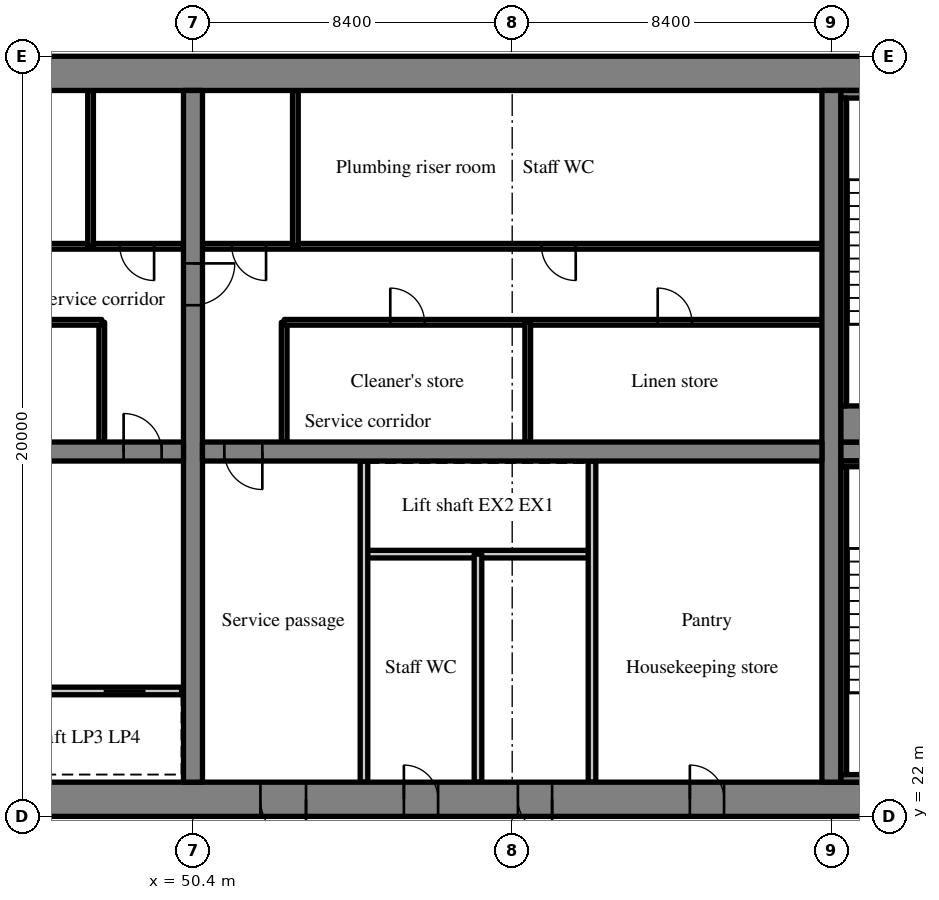
"""IFC4 building model, lengths in metres.
Left out: names, types, materials, properties, quantities, classifications, styles, units other than length and angle.
Written with IfcOpenShell. Run it as: python <this file> out.ifc"""

import sys

from ifc_helpers import new_model, si_unit, direction, frame, frame_2d, origin, place, context, subcontext, project, spatial, rectangle, extrude, source, transform, mapped, element, fill, save


model = new_model("IFC4")
c1 = context("Model", 3, precision=1e-05, world=origin(), true_north=direction((0.0, 1.0)))
c2 = subcontext(c1, "Body", "Model", "MODEL_VIEW")
j1 = project(units=[si_unit("LENGTHUNIT", "METRE"), si_unit("PLANEANGLEUNIT", "RADIAN")], contexts=[c1])
p1 = place(None, origin())
s1 = spatial("IfcSite", under=j1, at=p1, CompositionType="ELEMENT")
p2 = place(p1, origin())
s2 = spatial("IfcBuilding", under=s1, at=p2, CompositionType="ELEMENT")
p3 = place(p2, frame((0.0, 0.0, 121.8)))
s3 = spatial("IfcBuildingStorey", under=s2, at=p3, CompositionType="ELEMENT", Elevation=121.8)
m1 = source(origin(), c2, "Body", "SweptSolid", [
    extrude(rectangle(XDim=50.4, YDim=0.9, at=frame_2d((25.2, 0.0))), origin(), (0.0, 0.0, 1.0), 3.52),
])
p4 = place(p3, frame((25.2, 22.45, 0.0), z_axis=(0.0, 0.0, 1.0), x_axis=(1.0, 0.0, 0.0)))
e1 = element("IfcWall", 1, at=p4, inside=s3, PredefinedType="SHEAR", context=c2, shape_type="MappedRepresentation", body=[
    mapped(m1, transform((0.0, 0.0, 0.0), scale=1.0)),
])
m2 = source(origin(), c2, "Body", "SweptSolid", [
    extrude(rectangle(XDim=1.8, YDim=2.1, at=frame_2d((0.9, 1.05))), frame((0.0, 0.46, 0.0), z_axis=(0.0, -1.0, 0.0), x_axis=(1.0, 0.0, 0.0)), (0.0, 0.0, 1.0), 0.92),
])
p5 = place(p4, frame((15.9, 0.0, 0.0)))
e2 = element("IfcOpeningElement", 2, at=p5, cuts=e1, PredefinedType="OPENING", context=c2, shape_type="MappedRepresentation", body=[
    mapped(m2, transform((0.0, 0.0, 0.0), scale=1.0)),
])
m3 = source(origin(), c2, "Body", "SweptSolid", [
    extrude(rectangle(XDim=1.2, YDim=2.1, at=frame_2d((0.6, 1.05))), frame((0.0, 0.46, 0.0), z_axis=(0.0, -1.0, 0.0), x_axis=(1.0, 0.0, 0.0)), (0.0, 0.0, 1.0), 0.92),
])
p6 = place(p4, frame((26.975, 0.0, 0.0)))
e3 = element("IfcOpeningElement", 3, at=p6, cuts=e1, PredefinedType="OPENING", context=c2, shape_type="MappedRepresentation", body=[
    mapped(m3, transform((0.0, 0.0, 0.0), scale=1.0)),
])
m4 = source(origin(), c2, "Body", "SweptSolid", [
    extrude(rectangle(XDim=0.9, YDim=2.1, at=frame_2d((0.45, 1.05))), frame((0.0, 0.46, 0.0), z_axis=(0.0, -1.0, 0.0), x_axis=(1.0, 0.0, 0.0)), (0.0, 0.0, 1.0), 0.92),
])
p7 = place(p4, frame((33.75, 0.0, 0.0)))
e4 = element("IfcOpeningElement", 4, at=p7, cuts=e1, PredefinedType="OPENING", context=c2, shape_type="MappedRepresentation", body=[
    mapped(m4, transform((0.0, 0.0, 0.0), scale=1.0)),
])
p8 = place(p4, frame((30.75, 0.0, 0.0)))
e5 = element("IfcOpeningElement", 5, at=p8, cuts=e1, PredefinedType="OPENING", context=c2, shape_type="MappedRepresentation", body=[
    mapped(m4, transform((0.0, 0.0, 0.0), scale=1.0)),
])
p9 = place(p4, frame((38.275, 0.0, 0.0)))
e6 = element("IfcOpeningElement", 6, at=p9, cuts=e1, PredefinedType="OPENING", context=c2, shape_type="MappedRepresentation", body=[
    mapped(m4, transform((0.0, 0.0, 0.0), scale=1.0)),
])
p10 = place(p4, frame((6.45, 0.0, 0.0)))
e7 = element("IfcOpeningElement", 7, at=p10, cuts=e1, PredefinedType="OPENING", context=c2, shape_type="MappedRepresentation", body=[
    mapped(m3, transform((0.0, 0.0, 0.0), scale=1.0)),
])
p11 = place(p4, frame((47.775, 0.0, 0.0)))
e8 = element("IfcOpeningElement", 8, at=p11, cuts=e1, PredefinedType="OPENING", context=c2, shape_type="MappedRepresentation", body=[
    mapped(m3, transform((0.0, 0.0, 0.0), scale=1.0)),
])
p12 = place(p3, frame((25.2, 41.55, 0.0), z_axis=(0.0, 0.0, 1.0), x_axis=(1.0, 0.0, 0.0)))
e9 = element("IfcWall", 9, at=p12, inside=s3, PredefinedType="SHEAR", context=c2, shape_type="MappedRepresentation", body=[
    mapped(m1, transform((0.0, 0.0, 0.0), scale=1.0)),
])
m5 = source(origin(), c2, "Body", "SweptSolid", [
    extrude(rectangle(XDim=18.2, YDim=0.5, at=frame_2d((9.1, 0.0))), origin(), (0.0, 0.0, 1.0), 3.52),
])
p13 = place(p3, frame((50.4, 22.9, 0.0), z_axis=(0.0, 0.0, 1.0), x_axis=(0.0, 1.0, 0.0)))
e10 = element("IfcWall", 10, at=p13, inside=s3, PredefinedType="SHEAR", context=c2, shape_type="MappedRepresentation", body=[
    mapped(m5, transform((0.0, 0.0, 0.0), scale=1.0)),
])
m6 = source(origin(), c2, "Body", "SweptSolid", [
    extrude(rectangle(XDim=1.1, YDim=2.1, at=frame_2d((0.55, 1.05))), frame((0.0, 0.26, 0.0), z_axis=(0.0, -1.0, 0.0), x_axis=(1.0, 0.0, 0.0)), (0.0, 0.0, 1.0), 0.52),
])
p14 = place(p13, frame((12.55, 0.0, 0.0)))
e11 = element("IfcOpeningElement", 11, at=p14, cuts=e10, PredefinedType="OPENING", context=c2, shape_type="MappedRepresentation", body=[
    mapped(m6, transform((0.0, 0.0, 0.0), scale=1.0)),
])
p15 = place(p3, frame((67.2, 22.9, 0.0), z_axis=(0.0, 0.0, 1.0), x_axis=(0.0, 1.0, 0.0)))
e12 = element("IfcWall", 12, at=p15, inside=s3, PredefinedType="SHEAR", context=c2, shape_type="MappedRepresentation", body=[
    mapped(m5, transform((0.0, 0.0, 0.0), scale=1.0)),
])
m7 = source(origin(), c2, "Body", "SweptSolid", [
    extrude(rectangle(XDim=16.3, YDim=0.5, at=frame_2d((8.15, 0.0))), origin(), (0.0, 0.0, 1.0), 3.52),
])
p16 = place(p3, frame((33.85, 31.6, 0.0), z_axis=(0.0, 0.0, 1.0), x_axis=(1.0, 0.0, 0.0)))
e13 = element("IfcWall", 13, at=p16, inside=s3, PredefinedType="SHEAR", context=c2, shape_type="MappedRepresentation", body=[
    mapped(m7, transform((0.0, 0.0, 0.0), scale=1.0)),
])
m8 = source(origin(), c2, "Body", "SweptSolid", [
    extrude(rectangle(XDim=1.0, YDim=2.1, at=frame_2d((0.5, 1.05))), frame((0.0, 0.26, 0.0), z_axis=(0.0, -1.0, 0.0), x_axis=(1.0, 0.0, 0.0)), (0.0, 0.0, 1.0), 0.52),
])
p17 = place(p16, frame((14.725, 0.0, 0.0)))
e14 = element("IfcOpeningElement", 14, at=p17, cuts=e13, PredefinedType="OPENING", context=c2, shape_type="MappedRepresentation", body=[
    mapped(m8, transform((0.0, 0.0, 0.0), scale=1.0)),
])
m9 = source(origin(), c2, "Body", "SweptSolid", [
    extrude(rectangle(XDim=16.3, YDim=0.5, at=frame_2d((8.15, 0.0))), origin(), (0.0, 0.0, 1.0), 3.52),
])
p18 = place(p3, frame((50.65, 31.6, 0.0), z_axis=(0.0, 0.0, 1.0), x_axis=(1.0, 0.0, 0.0)))
e15 = element("IfcWall", 15, at=p18, inside=s3, PredefinedType="SHEAR", context=c2, shape_type="MappedRepresentation", body=[
    mapped(m9, transform((0.0, 0.0, 0.0), scale=1.0)),
])
p19 = place(p18, frame((0.575, 0.0, 0.0)))
e16 = element("IfcOpeningElement", 16, at=p19, cuts=e15, PredefinedType="OPENING", context=c2, shape_type="MappedRepresentation", body=[
    mapped(m8, transform((0.0, 0.0, 0.0), scale=1.0)),
])
m10 = source(origin(), c2, "Body", "SweptSolid", [
    extrude(rectangle(XDim=7.25, YDim=0.5, at=frame_2d((3.625, 0.0))), origin(), (0.0, 0.0, 1.0), 3.52),
])
p20 = place(p3, frame((67.45, 31.6, 0.0), z_axis=(0.0, 0.0, 1.0), x_axis=(1.0, 0.0, 0.0)))
e17 = element("IfcWall", 17, at=p20, inside=s3, PredefinedType="SHEAR", context=c2, shape_type="MappedRepresentation", body=[
    mapped(m10, transform((0.0, 0.0, 0.0), scale=1.0)),
])
p21 = place(p20, frame((5.575, 0.0, 0.0)))
e18 = element("IfcOpeningElement", 18, at=p21, cuts=e17, PredefinedType="OPENING", context=c2, shape_type="MappedRepresentation", body=[
    mapped(m6, transform((0.0, 0.0, 0.0), scale=1.0)),
])
m11 = source(origin(), c2, "Body", "SweptSolid", [
    extrude(rectangle(XDim=6.0, YDim=0.2, at=frame_2d((3.0, 0.0))), origin(), (0.0, 0.0, 1.0), 3.52),
])
p22 = place(p3, frame((44.1, 25.3, 0.0), z_axis=(0.0, 0.0, 1.0), x_axis=(1.0, 0.0, 0.0)))
e19 = element("IfcWall", 19, at=p22, inside=s3, PredefinedType="SOLIDWALL", context=c2, shape_type="MappedRepresentation", body=[
    mapped(m11, transform((0.0, 0.0, 0.0), scale=1.0)),
])
m12 = source(origin(), c2, "Body", "SweptSolid", [
    extrude(rectangle(XDim=1.1, YDim=2.1, at=frame_2d((0.55, 1.05))), frame((0.0, 0.11, 0.0), z_axis=(0.0, -1.0, 0.0), x_axis=(1.0, 0.0, 0.0)), (0.0, 0.0, 1.0), 0.22),
])
p23 = place(p22, frame((0.95, 0.0, 0.0)))
e20 = element("IfcOpeningElement", 20, at=p23, cuts=e19, PredefinedType="OPENING", context=c2, shape_type="MappedRepresentation", body=[
    mapped(m12, transform((0.0, 0.0, 0.0), scale=1.0)),
])
p24 = place(p22, frame((3.95, 0.0, 0.0)))
e21 = element("IfcOpeningElement", 21, at=p24, cuts=e19, PredefinedType="OPENING", context=c2, shape_type="MappedRepresentation", body=[
    mapped(m12, transform((0.0, 0.0, 0.0), scale=1.0)),
])
m13 = source(origin(), c2, "Body", "SweptSolid", [
    extrude(rectangle(XDim=3.15, YDim=0.15, at=frame_2d((1.575, 0.0))), origin(), (0.0, 0.0, 1.0), 3.52),
])
p25 = place(p3, frame((48.0, 31.85, 0.0), z_axis=(0.0, 0.0, 1.0), x_axis=(0.0, 1.0, 0.0)))
e22 = element("IfcWall", 22, at=p25, inside=s3, PredefinedType="PARTITIONING", context=c2, shape_type="MappedRepresentation", body=[
    mapped(m13, transform((0.0, 0.0, 0.0), scale=1.0)),
])
m14 = source(origin(), c2, "Body", "SweptSolid", [
    extrude(rectangle(XDim=14.15, YDim=0.15, at=frame_2d((7.075, 0.0))), origin(), (0.0, 0.0, 1.0), 3.52),
])
p26 = place(p3, frame((33.85, 35.0, 0.0), z_axis=(0.0, 0.0, 1.0), x_axis=(1.0, 0.0, 0.0)))
e23 = element("IfcWall", 23, at=p26, inside=s3, PredefinedType="PARTITIONING", context=c2, shape_type="MappedRepresentation", body=[
    mapped(m14, transform((0.0, 0.0, 0.0), scale=1.0)),
])
m15 = source(origin(), c2, "Body", "SweptSolid", [
    extrude(rectangle(XDim=0.9, YDim=2.1, at=frame_2d((0.45, 1.05))), frame((0.0, 0.085, 0.0), z_axis=(0.0, -1.0, 0.0), x_axis=(1.0, 0.0, 0.0)), (0.0, 0.0, 1.0), 0.17),
])
p27 = place(p26, frame((6.588, 0.0, 0.0)))
e24 = element("IfcOpeningElement", 24, at=p27, cuts=e23, PredefinedType="OPENING", context=c2, shape_type="MappedRepresentation", body=[
    mapped(m15, transform((0.0, 0.0, 0.0), scale=1.0)),
])
m16 = source(origin(), c2, "Body", "SweptSolid", [
    extrude(rectangle(XDim=16.3, YDim=0.15, at=frame_2d((8.15, 0.0))), origin(), (0.0, 0.0, 1.0), 3.52),
])
p28 = place(p3, frame((33.85, 37.0, 0.0), z_axis=(0.0, 0.0, 1.0), x_axis=(1.0, 0.0, 0.0)))
e25 = element("IfcWall", 25, at=p28, inside=s3, PredefinedType="PARTITIONING", context=c2, shape_type="MappedRepresentation", body=[
    mapped(m16, transform((0.0, 0.0, 0.0), scale=1.0)),
])
p29 = place(p28, frame((0.773, 0.0, 0.0)))
e26 = element("IfcOpeningElement", 26, at=p29, cuts=e25, PredefinedType="OPENING", context=c2, shape_type="MappedRepresentation", body=[
    mapped(m15, transform((0.0, 0.0, 0.0), scale=1.0)),
])
p30 = place(p28, frame((3.625, 0.0, 0.0)))
e27 = element("IfcOpeningElement", 27, at=p30, cuts=e25, PredefinedType="OPENING", context=c2, shape_type="MappedRepresentation", body=[
    mapped(m15, transform((0.0, 0.0, 0.0), scale=1.0)),
])
p31 = place(p28, frame((9.33, 0.0, 0.0)))
e28 = element("IfcOpeningElement", 28, at=p31, cuts=e25, PredefinedType="OPENING", context=c2, shape_type="MappedRepresentation", body=[
    mapped(m15, transform((0.0, 0.0, 0.0), scale=1.0)),
])
p32 = place(p28, frame((14.627, 0.0, 0.0)))
e29 = element("IfcOpeningElement", 29, at=p32, cuts=e25, PredefinedType="OPENING", context=c2, shape_type="MappedRepresentation", body=[
    mapped(m15, transform((0.0, 0.0, 0.0), scale=1.0)),
])
m17 = source(origin(), c2, "Body", "SweptSolid", [
    extrude(rectangle(XDim=4.1, YDim=0.15, at=frame_2d((2.05, 0.0))), origin(), (0.0, 0.0, 1.0), 3.52),
])
p33 = place(p3, frame((47.705, 37.0, 0.0), z_axis=(0.0, 0.0, 1.0), x_axis=(0.0, 1.0, 0.0)))
e30 = element("IfcWall", 30, at=p33, inside=s3, PredefinedType="PARTITIONING", context=c2, shape_type="MappedRepresentation", body=[
    mapped(m17, transform((0.0, 0.0, 0.0), scale=1.0)),
])
p34 = place(p3, frame((60.9, 28.9, 0.0), z_axis=(0.0, 0.0, 1.0), x_axis=(-1.0, 0.0, 0.0)))
e31 = element("IfcWall", 31, at=p34, inside=s3, PredefinedType="SOLIDWALL", context=c2, shape_type="MappedRepresentation", body=[
    mapped(m11, transform((0.0, 0.0, 0.0), scale=1.0)),
])
m18 = source(origin(), c2, "Body", "SweptSolid", [
    extrude(rectangle(XDim=8.45, YDim=0.2, at=frame_2d((4.225, 0.0))), origin(), (0.0, 0.0, 1.0), 3.52),
])
for number, where, z_axis, x_axis in (
    (32, (54.9, 22.9, 0.0), (0.0, 0.0, 1.0), (0.0, 1.0, 0.0)),
    (33, (60.9, 22.9, 0.0), (0.0, 0.0, 1.0), (0.0, 1.0, 0.0)),
):
    element("IfcWall", number, at=place(p3, frame(where, z_axis=z_axis, x_axis=x_axis)), inside=s3, PredefinedType="PARTITIONING", context=c2, shape_type="MappedRepresentation", body=[
        mapped(m18, transform((0.0, 0.0, 0.0), scale=1.0)),
    ])
p35 = place(p3, frame((57.9, 22.9, 0.0), z_axis=(0.0, 0.0, 1.0), x_axis=(0.0, 1.0, 0.0)))
e34 = element("IfcWall", 34, at=p35, inside=s3, PredefinedType="PARTITIONING", context=c2, shape_type="MappedRepresentation", body=[
    mapped(m11, transform((0.0, 0.0, 0.0), scale=1.0)),
])
p36 = place(p3, frame((52.8, 31.85, 0.0), z_axis=(0.0, 0.0, 1.0), x_axis=(0.0, 1.0, 0.0)))
e35 = element("IfcWall", 35, at=p36, inside=s3, PredefinedType="PARTITIONING", context=c2, shape_type="MappedRepresentation", body=[
    mapped(m13, transform((0.0, 0.0, 0.0), scale=1.0)),
])
p37 = place(p3, frame((66.95, 35.0, 0.0), z_axis=(0.0, 0.0, 1.0), x_axis=(-1.0, 0.0, 0.0)))
e36 = element("IfcWall", 36, at=p37, inside=s3, PredefinedType="PARTITIONING", context=c2, shape_type="MappedRepresentation", body=[
    mapped(m14, transform((0.0, 0.0, 0.0), scale=1.0)),
])
p38 = place(p37, frame((3.421, 0.0, 0.0)))
e37 = element("IfcOpeningElement", 37, at=p38, cuts=e36, PredefinedType="OPENING", context=c2, shape_type="MappedRepresentation", body=[
    mapped(m15, transform((0.0, 0.0, 0.0), scale=1.0)),
])
p39 = place(p37, frame((10.458, 0.0, 0.0)))
e38 = element("IfcOpeningElement", 38, at=p39, cuts=e36, PredefinedType="OPENING", context=c2, shape_type="MappedRepresentation", body=[
    mapped(m15, transform((0.0, 0.0, 0.0), scale=1.0)),
])
m19 = source(origin(), c2, "Body", "SweptSolid", [
    extrude(rectangle(XDim=16.3, YDim=0.15, at=frame_2d((8.15, 0.0))), origin(), (0.0, 0.0, 1.0), 3.52),
])
p40 = place(p3, frame((66.95, 37.0, 0.0), z_axis=(0.0, 0.0, 1.0), x_axis=(-1.0, 0.0, 0.0)))
e39 = element("IfcWall", 39, at=p40, inside=s3, PredefinedType="PARTITIONING", context=c2, shape_type="MappedRepresentation", body=[
    mapped(m19, transform((0.0, 0.0, 0.0), scale=1.0)),
])
p41 = place(p40, frame((6.478, 0.0, 0.0)))
e40 = element("IfcOpeningElement", 40, at=p41, cuts=e39, PredefinedType="OPENING", context=c2, shape_type="MappedRepresentation", body=[
    mapped(m15, transform((0.0, 0.0, 0.0), scale=1.0)),
])
p42 = place(p40, frame((14.627, 0.0, 0.0)))
e41 = element("IfcOpeningElement", 41, at=p42, cuts=e39, PredefinedType="OPENING", context=c2, shape_type="MappedRepresentation", body=[
    mapped(m15, transform((0.0, 0.0, 0.0), scale=1.0)),
])
p43 = place(p3, frame((59.209, 31.85, 0.0), z_axis=(0.0, 0.0, 1.0), x_axis=(0.0, 1.0, 0.0)))
e42 = element("IfcWall", 42, at=p43, inside=s3, PredefinedType="PARTITIONING", context=c2, shape_type="MappedRepresentation", body=[
    mapped(m13, transform((0.0, 0.0, 0.0), scale=1.0)),
])
p44 = place(p3, frame((53.095, 37.0, 0.0), z_axis=(0.0, 0.0, 1.0), x_axis=(0.0, 1.0, 0.0)))
e43 = element("IfcWall", 43, at=p44, inside=s3, PredefinedType="PARTITIONING", context=c2, shape_type="MappedRepresentation", body=[
    mapped(m17, transform((0.0, 0.0, 0.0), scale=1.0)),
])
m20 = source(origin(), c2, "Body", "SweptSolid", [
    extrude(rectangle(XDim=4.8, YDim=0.2, at=frame_2d((2.4, 0.0))), origin(), (0.0, 0.0, 1.0), 3.52),
])
p45 = place(p3, frame((67.45, 23.0, 0.0), z_axis=(0.0, 0.0, 1.0), x_axis=(1.0, 0.0, 0.0)))
e44 = element("IfcWall", 44, at=p45, inside=s3, PredefinedType="SOLIDWALL", context=c2, shape_type="MappedRepresentation", body=[
    mapped(m20, transform((0.0, 0.0, 0.0), scale=1.0)),
])
m21 = source(origin(), c2, "Body", "SweptSolid", [
    extrude(rectangle(XDim=4.8, YDim=0.15, at=frame_2d((2.4, 0.0))), origin(), (0.0, 0.0, 1.0), 3.52),
])
p46 = place(p3, frame((67.45, 31.275, 0.0), z_axis=(0.0, 0.0, 1.0), x_axis=(1.0, 0.0, 0.0)))
e45 = element("IfcWall", 45, at=p46, inside=s3, PredefinedType="SOLIDWALL", context=c2, shape_type="MappedRepresentation", body=[
    mapped(m21, transform((0.0, 0.0, 0.0), scale=1.0)),
])
m22 = source(origin(), c2, "Body", "SweptSolid", [
    extrude(rectangle(XDim=8.1, YDim=0.15, at=frame_2d((4.05, 0.0))), origin(), (0.0, 0.0, 1.0), 3.52),
])
p47 = place(p3, frame((67.525, 23.1, 0.0), z_axis=(0.0, 0.0, 1.0), x_axis=(0.0, 1.0, 0.0)))
e46 = element("IfcWall", 46, at=p47, inside=s3, PredefinedType="SOLIDWALL", context=c2, shape_type="MappedRepresentation", body=[
    mapped(m22, transform((0.0, 0.0, 0.0), scale=1.0)),
])
p48 = place(p3, frame((67.45, 41.0, 0.0), z_axis=(0.0, 0.0, 1.0), x_axis=(1.0, 0.0, 0.0)))
e47 = element("IfcWall", 47, at=p48, inside=s3, PredefinedType="SOLIDWALL", context=c2, shape_type="MappedRepresentation", body=[
    mapped(m20, transform((0.0, 0.0, 0.0), scale=1.0)),
])
m23 = source(origin(), c2, "Body", "SweptSolid", [
    extrude(rectangle(XDim=4.8, YDim=0.95, at=frame_2d((2.4, 0.0))), origin(), (0.0, 0.0, 1.0), 3.52),
])
p49 = place(p3, frame((67.45, 32.325, 0.0), z_axis=(0.0, 0.0, 1.0), x_axis=(1.0, 0.0, 0.0)))
e48 = element("IfcWall", 48, at=p49, inside=s3, PredefinedType="SOLIDWALL", context=c2, shape_type="MappedRepresentation", body=[
    mapped(m23, transform((0.0, 0.0, 0.0), scale=1.0)),
])
p50 = place(p3, frame((67.525, 32.8, 0.0), z_axis=(0.0, 0.0, 1.0), x_axis=(0.0, 1.0, 0.0)))
e49 = element("IfcWall", 49, at=p50, inside=s3, PredefinedType="SOLIDWALL", context=c2, shape_type="MappedRepresentation", body=[
    mapped(m22, transform((0.0, 0.0, 0.0), scale=1.0)),
])
m24 = source(origin(), c2, "Body", "SweptSolid", [
    extrude(rectangle(XDim=1.0, YDim=2.1, at=frame_2d((0.5, 1.05))), frame((0.0, 0.025, 0.0), z_axis=(0.0, -1.0, 0.0), x_axis=(1.0, 0.0, 0.0)), (0.0, 0.0, 1.0), 0.05),
])
p51 = place(p17, origin())
e50 = element("IfcDoor", 50, at=p51, inside=s3, OperationType="SINGLE_SWING_LEFT", PredefinedType="DOOR", context=c2, shape_type="MappedRepresentation", body=[
    mapped(m24, transform((0.0, 0.0, 0.0), scale=1.0)),
])
fill(e14, e50)
m25 = source(origin(), c2, "Body", "SweptSolid", [
    extrude(rectangle(XDim=1.1, YDim=2.1, at=frame_2d((0.55, 1.05))), frame((0.0, 0.025, 0.0), z_axis=(0.0, -1.0, 0.0), x_axis=(1.0, 0.0, 0.0)), (0.0, 0.0, 1.0), 0.05),
])
p52 = place(p24, origin())
e51 = element("IfcDoor", 51, at=p52, inside=s3, OperationType="SLIDING_TO_RIGHT", PredefinedType="DOOR", context=c2, shape_type="MappedRepresentation", body=[
    mapped(m25, transform((0.0, 0.0, 0.0), scale=1.0)),
])
fill(e21, e51)
m26 = source(origin(), c2, "Body", "SweptSolid", [
    extrude(rectangle(XDim=0.9, YDim=2.1, at=frame_2d((0.45, 1.05))), frame((0.0, 0.025, 0.0), z_axis=(0.0, -1.0, 0.0), x_axis=(1.0, 0.0, 0.0)), (0.0, 0.0, 1.0), 0.05),
])
p53 = place(p32, origin())
e52 = element("IfcDoor", 52, at=p53, inside=s3, OperationType="SINGLE_SWING_RIGHT", PredefinedType="DOOR", context=c2, shape_type="MappedRepresentation", body=[
    mapped(m26, transform((0.0, 0.0, 0.0), scale=1.0)),
])
fill(e29, e52)
m27 = source(origin(), c2, "Body", "SweptSolid", [
    extrude(rectangle(XDim=1.2, YDim=2.1, at=frame_2d((0.6, 1.05))), frame((0.0, 0.375, 0.0), z_axis=(0.0, -1.0, 0.0), x_axis=(1.0, 0.0, 0.0)), (0.0, 0.0, 1.0), 0.05),
])
p54 = place(p6, origin())
e53 = element("IfcDoor", 53, at=p54, inside=s3, OperationType="SINGLE_SWING_RIGHT", PredefinedType="DOOR", context=c2, shape_type="MappedRepresentation", body=[
    mapped(m27, transform((0.0, 0.0, 0.0), scale=1.0)),
])
fill(e3, e53)
p55 = place(p19, origin())
e54 = element("IfcDoor", 54, at=p55, inside=s3, OperationType="SINGLE_SWING_RIGHT", PredefinedType="DOOR", context=c2, shape_type="MappedRepresentation", body=[
    mapped(m24, transform((0.0, 0.0, 0.0), scale=1.0)),
])
fill(e16, e54)
m28 = source(origin(), c2, "Body", "SweptSolid", [
    extrude(rectangle(XDim=0.9, YDim=2.1, at=frame_2d((0.45, 1.05))), frame((0.0, 0.375, 0.0), z_axis=(0.0, -1.0, 0.0), x_axis=(1.0, 0.0, 0.0)), (0.0, 0.0, 1.0), 0.05),
])
p56 = place(p7, origin())
e55 = element("IfcDoor", 55, at=p56, inside=s3, OperationType="SINGLE_SWING_RIGHT", PredefinedType="DOOR", context=c2, shape_type="MappedRepresentation", body=[
    mapped(m28, transform((0.0, 0.0, 0.0), scale=1.0)),
])
fill(e4, e55)
p57 = place(p8, origin())
e56 = element("IfcDoor", 56, at=p57, inside=s3, OperationType="SINGLE_SWING_LEFT", PredefinedType="DOOR", context=c2, shape_type="MappedRepresentation", body=[
    mapped(m28, transform((0.0, 0.0, 0.0), scale=1.0)),
])
fill(e5, e56)
p58 = place(p9, origin())
e57 = element("IfcDoor", 57, at=p58, inside=s3, OperationType="SINGLE_SWING_LEFT", PredefinedType="DOOR", context=c2, shape_type="MappedRepresentation", body=[
    mapped(m28, transform((0.0, 0.0, 0.0), scale=1.0)),
])
fill(e6, e57)
p59 = place(p38, origin())
e58 = element("IfcDoor", 58, at=p59, inside=s3, OperationType="SINGLE_SWING_RIGHT", PredefinedType="DOOR", context=c2, shape_type="MappedRepresentation", body=[
    mapped(m26, transform((0.0, 0.0, 0.0), scale=1.0)),
])
fill(e37, e58)
p60 = place(p39, origin())
e59 = element("IfcDoor", 59, at=p60, inside=s3, OperationType="SINGLE_SWING_RIGHT", PredefinedType="DOOR", context=c2, shape_type="MappedRepresentation", body=[
    mapped(m26, transform((0.0, 0.0, 0.0), scale=1.0)),
])
fill(e38, e59)
p61 = place(p41, origin())
e60 = element("IfcDoor", 60, at=p61, inside=s3, OperationType="SINGLE_SWING_LEFT", PredefinedType="DOOR", context=c2, shape_type="MappedRepresentation", body=[
    mapped(m26, transform((0.0, 0.0, 0.0), scale=1.0)),
])
fill(e40, e60)
p62 = place(p42, origin())
e61 = element("IfcDoor", 61, at=p62, inside=s3, OperationType="SINGLE_SWING_LEFT", PredefinedType="DOOR", context=c2, shape_type="MappedRepresentation", body=[
    mapped(m26, transform((0.0, 0.0, 0.0), scale=1.0)),
])
fill(e41, e61)
p63 = place(p14, origin())
e62 = element("IfcDoor", 62, at=p63, inside=s3, OperationType="SINGLE_SWING_RIGHT", PredefinedType="DOOR", context=c2, shape_type="MappedRepresentation", body=[
    mapped(m25, transform((0.0, 0.0, 0.0), scale=1.0)),
])
fill(e11, e62)
save(model, sys.argv[1])
